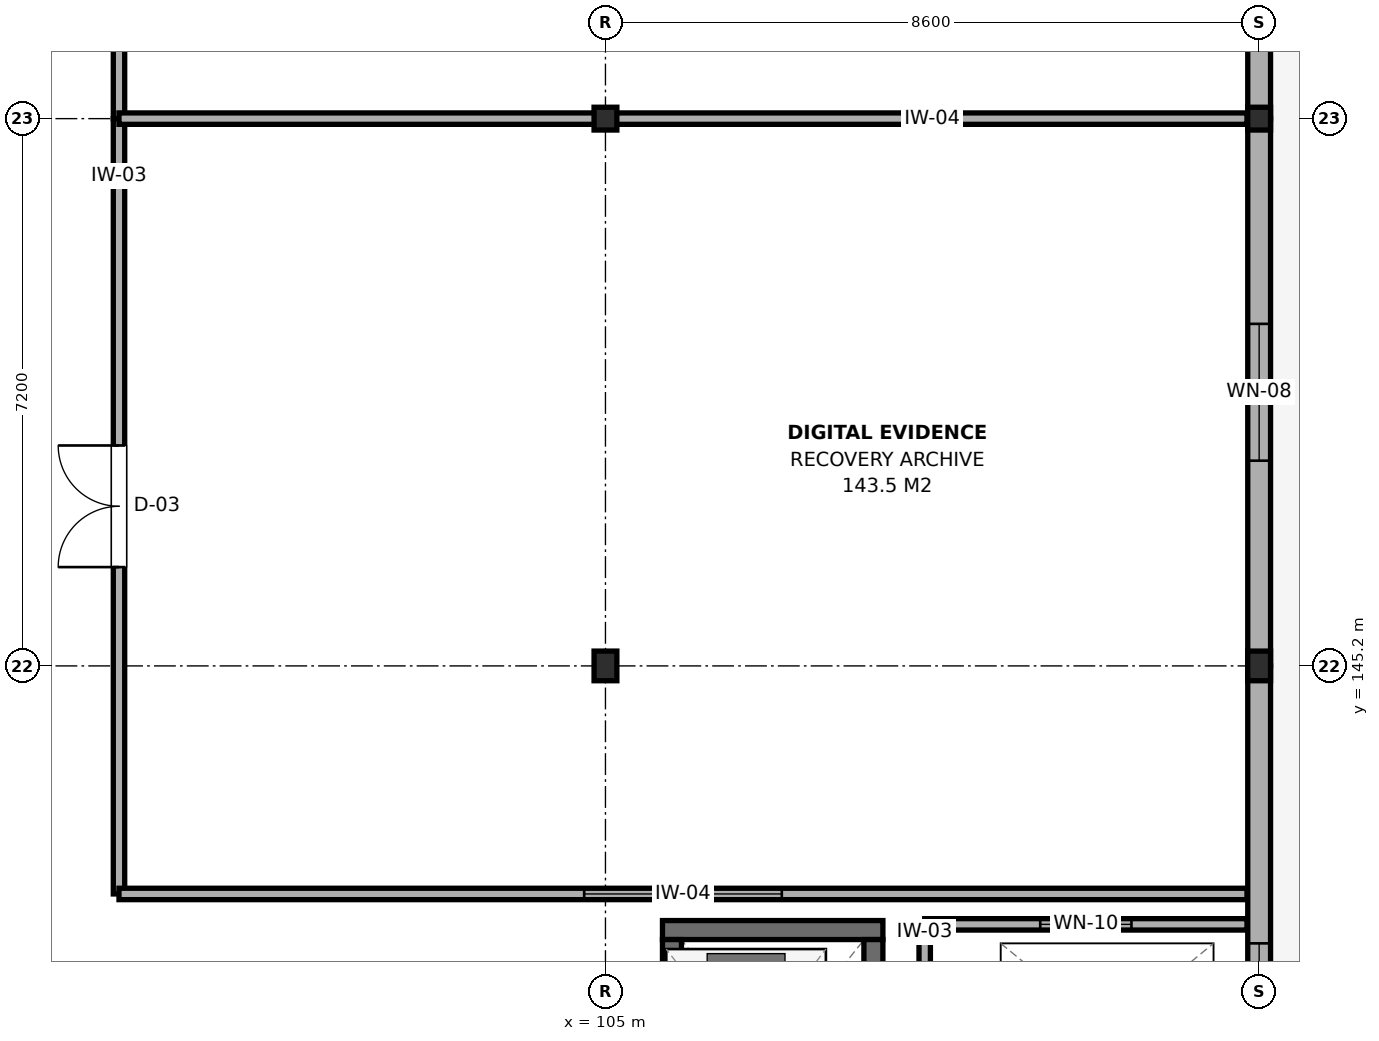
"""IFC4 building model, lengths in metres.
Left out: names, types, materials, properties, quantities, classifications, styles, units other than length and angle.
Written with IfcOpenShell. Run it as: python <this file> out.ifc"""

import sys

from ifc_helpers import new_model, si_unit, direction, frame, frame_2d, origin, origin_2d, place, context, subcontext, project, spatial, rectangle, i_section, extrude, element, fill, save


model = new_model("IFC4")
c1 = context("Model", 3, precision=1e-05, world=origin(), true_north=direction((0.0, 1.0)))
c2 = subcontext(c1, "Body", "Model", "MODEL_VIEW")
j1 = project(units=[si_unit("LENGTHUNIT", "METRE"), si_unit("PLANEANGLEUNIT", "RADIAN")], contexts=[c1])
p1 = place(None, origin())
s1 = spatial("IfcSite", under=j1, at=p1, CompositionType="ELEMENT")
p2 = place(p1, origin())
s2 = spatial("IfcBuilding", under=s1, at=p2, CompositionType="ELEMENT")
p3 = place(p2, frame((0.0, 0.0, 17.1)))
s3 = spatial("IfcBuildingStorey", under=s2, at=p3, CompositionType="ELEMENT", Elevation=17.1)
p4 = place(p3, frame((105.0, 145.2, 0.0), z_axis=(0.0, 0.0, 1.0), x_axis=(1.0, 0.0, 0.0)))
e1 = element("IfcColumn", 1, at=p4, inside=s3, PredefinedType="COLUMN", context=c2, shape_type="SweptSolid", body=[
    extrude(i_section(OverallWidth=0.3, OverallDepth=0.39, WebThickness=0.011, FlangeThickness=0.019, FilletRadius=0.027, at=origin_2d()), origin(), (0.0, 0.0, 1.0), 3.9),
])
p5 = place(p3, frame((105.0, 152.4, 0.0), z_axis=(0.0, 0.0, 1.0), x_axis=(1.0, 0.0, 0.0)))
e2 = element("IfcColumn", 2, at=p5, inside=s3, PredefinedType="COLUMN", context=c2, shape_type="SweptSolid", body=[
    extrude(i_section(OverallWidth=0.3, OverallDepth=0.3, WebThickness=0.011, FlangeThickness=0.019, FilletRadius=0.027, at=origin_2d()), origin(), (0.0, 0.0, 1.0), 3.9),
])
p6 = place(p3, frame((113.6, 145.2, 0.0), z_axis=(0.0, 0.0, 1.0), x_axis=(1.0, 0.0, 0.0)))
e3 = element("IfcColumn", 3, at=p6, inside=s3, PredefinedType="COLUMN", context=c2, shape_type="SweptSolid", body=[
    extrude(i_section(OverallWidth=0.3, OverallDepth=0.39, WebThickness=0.011, FlangeThickness=0.019, FilletRadius=0.027, at=origin_2d()), origin(), (0.0, 0.0, 1.0), 3.9),
])
p7 = place(p3, frame((113.6, 152.4, 0.0), z_axis=(0.0, 0.0, 1.0), x_axis=(1.0, 0.0, 0.0)))
e4 = element("IfcColumn", 4, at=p7, inside=s3, PredefinedType="COLUMN", context=c2, shape_type="SweptSolid", body=[
    extrude(i_section(OverallWidth=0.3, OverallDepth=0.3, WebThickness=0.011, FlangeThickness=0.019, FilletRadius=0.027, at=origin_2d()), origin(), (0.0, 0.0, 1.0), 3.9),
])
p8 = place(p3, frame((105.75, 141.725, 0.0), z_axis=(0.0, 0.0, 1.0), x_axis=(1.0, 0.0, 0.0)))
e5 = element("IfcWall", 5, at=p8, inside=s3, PredefinedType="SHEAR", context=c2, shape_type="SweptSolid", body=[
    extrude(rectangle(XDim=2.9, YDim=0.25, at=frame_2d((1.45, 0.0))), origin(), (0.0, 0.0, 1.0), 3.7),
])
p9 = place(p3, frame((105.875, 138.6, 0.0), z_axis=(0.0, 0.0, 1.0), x_axis=(0.0, 1.0, 0.0)))
e6 = element("IfcWall", 6, at=p9, inside=s3, PredefinedType="SHEAR", context=c2, shape_type="SweptSolid", body=[
    extrude(rectangle(XDim=3.0, YDim=0.25, at=frame_2d((1.5, 0.0))), origin(), (0.0, 0.0, 1.0), 3.7),
])
p10 = place(p9, frame((0.925, 0.0, 0.0)))
e7 = element("IfcOpeningElement", 7, at=p10, cuts=e6, PredefinedType="OPENING", context=c2, shape_type="SweptSolid", body=[
    extrude(rectangle(XDim=1.15, YDim=2.15, at=frame_2d((0.575, 1.075))), frame((0.0, 0.14, 0.0), z_axis=(0.0, -1.0, 0.0), x_axis=(1.0, 0.0, 0.0)), (0.0, 0.0, 1.0), 0.28),
])
p11 = place(p3, frame((108.525, 138.6, 0.0), z_axis=(0.0, 0.0, 1.0), x_axis=(0.0, 1.0, 0.0)))
e8 = element("IfcWall", 8, at=p11, inside=s3, PredefinedType="SHEAR", context=c2, shape_type="SweptSolid", body=[
    extrude(rectangle(XDim=3.0, YDim=0.25, at=frame_2d((1.5, 0.0))), origin(), (0.0, 0.0, 1.0), 3.7),
])
p12 = place(p3, frame((113.6, 138.0, 0.0), z_axis=(0.0, 0.0, 1.0), x_axis=(0.0, 1.0, 0.0)))
e9 = element("IfcWall", 9, at=p12, inside=s3, PredefinedType="SOLIDWALL", context=c2, shape_type="SweptSolid", body=[
    extrude(rectangle(XDim=7.2, YDim=0.3, at=frame_2d((3.6, 0.0))), origin(), (0.0, 0.0, 1.0), 3.095),
])
p13 = place(p12, frame((1.75, 0.0, 0.65)))
e10 = element("IfcOpeningElement", 10, at=p13, cuts=e9, PredefinedType="OPENING", context=c2, shape_type="SweptSolid", body=[
    extrude(rectangle(XDim=1.8, YDim=1.2, at=frame_2d((0.9, 0.6))), frame((0.0, 0.165, 0.0), z_axis=(0.0, -1.0, 0.0), x_axis=(1.0, 0.0, 0.0)), (0.0, 0.0, 1.0), 0.33),
])
p14 = place(p3, frame((113.6, 145.2, 0.0), z_axis=(0.0, 0.0, 1.0), x_axis=(0.0, 1.0, 0.0)))
e11 = element("IfcWall", 11, at=p14, inside=s3, PredefinedType="SOLIDWALL", context=c2, shape_type="SweptSolid", body=[
    extrude(rectangle(XDim=7.2, YDim=0.3, at=frame_2d((3.6, 0.0))), origin(), (0.0, 0.0, 1.0), 3.095),
])
p15 = place(p14, frame((2.7, 0.0, 0.65)))
e12 = element("IfcOpeningElement", 12, at=p15, cuts=e11, PredefinedType="OPENING", context=c2, shape_type="SweptSolid", body=[
    extrude(rectangle(XDim=1.8, YDim=1.2, at=frame_2d((0.9, 0.6))), frame((0.0, 0.165, 0.0), z_axis=(0.0, -1.0, 0.0), x_axis=(1.0, 0.0, 0.0)), (0.0, 0.0, 1.0), 0.33),
])
p16 = place(p3, frame((113.6, 152.4, 0.0), z_axis=(0.0, 0.0, 1.0), x_axis=(0.0, 1.0, 0.0)))
e13 = element("IfcWall", 13, at=p16, inside=s3, PredefinedType="SOLIDWALL", context=c2, shape_type="SweptSolid", body=[
    extrude(rectangle(XDim=7.2, YDim=0.3, at=frame_2d((3.6, 0.0))), origin(), (0.0, 0.0, 1.0), 3.095),
])
p17 = place(p16, frame((2.7, 0.0, 0.65)))
e14 = element("IfcOpeningElement", 14, at=p17, cuts=e13, PredefinedType="OPENING", context=c2, shape_type="SweptSolid", body=[
    extrude(rectangle(XDim=1.8, YDim=1.2, at=frame_2d((0.9, 0.6))), frame((0.0, 0.165, 0.0), z_axis=(0.0, -1.0, 0.0), x_axis=(1.0, 0.0, 0.0)), (0.0, 0.0, 1.0), 0.33),
])
p18 = place(p3, frame((109.2, 141.8, 0.0), z_axis=(0.0, 0.0, 1.0), x_axis=(1.0, 0.0, 0.0)))
e15 = element("IfcWall", 15, at=p18, inside=s3, PredefinedType="PARTITIONING", context=c2, shape_type="SweptSolid", body=[
    extrude(rectangle(XDim=4.24, YDim=0.15, at=frame_2d((2.12, 0.0))), origin(), (0.0, 0.0, 1.0), 3.365),
])
p19 = place(p18, frame((1.52, 0.0, 0.95)))
e16 = element("IfcOpeningElement", 16, at=p19, cuts=e15, PredefinedType="OPENING", context=c2, shape_type="SweptSolid", body=[
    extrude(rectangle(XDim=1.2, YDim=1.5, at=frame_2d((0.6, 0.75))), frame((0.0, 0.09, 0.0), z_axis=(0.0, -1.0, 0.0), x_axis=(1.0, 0.0, 0.0)), (0.0, 0.0, 1.0), 0.18),
])
p20 = place(p3, frame((109.2, 139.0, 0.0), z_axis=(0.0, 0.0, 1.0), x_axis=(0.0, 1.0, 0.0)))
e17 = element("IfcWall", 17, at=p20, inside=s3, PredefinedType="PARTITIONING", context=c2, shape_type="SweptSolid", body=[
    extrude(rectangle(XDim=2.8, YDim=0.15, at=frame_2d((1.4, 0.0))), origin(), (0.0, 0.0, 1.0), 3.695),
])
p21 = place(p20, frame((0.975, 0.0, 0.0)))
e18 = element("IfcOpeningElement", 18, at=p21, cuts=e17, PredefinedType="OPENING", context=c2, shape_type="SweptSolid", body=[
    extrude(rectangle(XDim=0.85, YDim=2.1, at=frame_2d((0.425, 1.05))), frame((0.0, 0.09, 0.0), z_axis=(0.0, -1.0, 0.0), x_axis=(1.0, 0.0, 0.0)), (0.0, 0.0, 1.0), 0.18),
])
p22 = place(p3, frame((98.6, 142.2, 0.0), z_axis=(0.0, 0.0, 1.0), x_axis=(0.0, 1.0, 0.0)))
e19 = element("IfcWall", 19, at=p22, inside=s3, PredefinedType="PARTITIONING", context=c2, shape_type="SweptSolid", body=[
    extrude(rectangle(XDim=10.2, YDim=0.15, at=frame_2d((5.1, 0.0))), origin(), (0.0, 0.0, 1.0), 3.255),
])
p23 = place(p22, frame((4.3, 0.0, 0.0)))
e20 = element("IfcOpeningElement", 20, at=p23, cuts=e19, PredefinedType="OPENING", context=c2, shape_type="SweptSolid", body=[
    extrude(rectangle(XDim=1.6, YDim=2.15, at=frame_2d((0.8, 1.075))), frame((0.0, 0.09, 0.0), z_axis=(0.0, -1.0, 0.0), x_axis=(1.0, 0.0, 0.0)), (0.0, 0.0, 1.0), 0.18),
])
p24 = place(p3, frame((98.6, 142.2, 0.0), z_axis=(0.0, 0.0, 1.0), x_axis=(1.0, 0.0, 0.0)))
e21 = element("IfcWall", 21, at=p24, inside=s3, PredefinedType="PARTITIONING", context=c2, shape_type="SweptSolid", body=[
    extrude(rectangle(XDim=14.84, YDim=0.15, at=frame_2d((7.42, 0.0))), origin(), (0.0, 0.0, 1.0), 3.365),
])
p25 = place(p24, frame((6.12, 0.0, 0.95)))
e22 = element("IfcOpeningElement", 22, at=p25, cuts=e21, PredefinedType="OPENING", context=c2, shape_type="SweptSolid", body=[
    extrude(rectangle(XDim=2.6, YDim=1.5, at=frame_2d((1.3, 0.75))), frame((0.0, 0.09, 0.0), z_axis=(0.0, -1.0, 0.0), x_axis=(1.0, 0.0, 0.0)), (0.0, 0.0, 1.0), 0.18),
])
p26 = place(p3, frame((98.6, 152.4, 0.0), z_axis=(0.0, 0.0, 1.0), x_axis=(0.0, 1.0, 0.0)))
e23 = element("IfcWall", 23, at=p26, inside=s3, PredefinedType="PARTITIONING", context=c2, shape_type="SweptSolid", body=[
    extrude(rectangle(XDim=7.2, YDim=0.15, at=frame_2d((3.6, 0.0))), origin(), (0.0, 0.0, 1.0), 3.155),
])
p27 = place(p26, frame((2.8, 0.0, 0.0)))
e24 = element("IfcOpeningElement", 24, at=p27, cuts=e23, PredefinedType="OPENING", context=c2, shape_type="SweptSolid", body=[
    extrude(rectangle(XDim=1.6, YDim=2.15, at=frame_2d((0.8, 1.075))), frame((0.0, 0.09, 0.0), z_axis=(0.0, -1.0, 0.0), x_axis=(1.0, 0.0, 0.0)), (0.0, 0.0, 1.0), 0.18),
])
p28 = place(p3, frame((98.6, 152.4, 0.0), z_axis=(0.0, 0.0, 1.0), x_axis=(1.0, 0.0, 0.0)))
e25 = element("IfcWall", 25, at=p28, inside=s3, PredefinedType="PARTITIONING", context=c2, shape_type="SweptSolid", body=[
    extrude(rectangle(XDim=14.84, YDim=0.15, at=frame_2d((7.42, 0.0))), origin(), (0.0, 0.0, 1.0), 3.095),
])
p29 = place(p13, origin())
e26 = element("IfcWindow", 26, at=p29, inside=s3, PartitioningType="SINGLE_PANEL", PredefinedType="WINDOW", context=c2, shape_type="SweptSolid", body=[
    extrude(rectangle(XDim=1.8, YDim=1.2, at=frame_2d((0.9, 0.6))), frame((0.0, 0.03, 0.0), z_axis=(0.0, -1.0, 0.0), x_axis=(1.0, 0.0, 0.0)), (0.0, 0.0, 1.0), 0.06),
])
fill(e10, e26)
p30 = place(p15, origin())
e27 = element("IfcWindow", 27, at=p30, inside=s3, PartitioningType="SINGLE_PANEL", PredefinedType="WINDOW", context=c2, shape_type="SweptSolid", body=[
    extrude(rectangle(XDim=1.8, YDim=1.2, at=frame_2d((0.9, 0.6))), frame((0.0, 0.03, 0.0), z_axis=(0.0, -1.0, 0.0), x_axis=(1.0, 0.0, 0.0)), (0.0, 0.0, 1.0), 0.06),
])
fill(e12, e27)
p31 = place(p19, origin())
e28 = element("IfcWindow", 28, at=p31, inside=s3, PartitioningType="SINGLE_PANEL", PredefinedType="WINDOW", context=c2, shape_type="SweptSolid", body=[
    extrude(rectangle(XDim=1.2, YDim=1.5, at=frame_2d((0.6, 0.75))), frame((0.0, 0.03, 0.0), z_axis=(0.0, -1.0, 0.0), x_axis=(1.0, 0.0, 0.0)), (0.0, 0.0, 1.0), 0.06),
])
fill(e16, e28)
p32 = place(p23, origin())
e29 = element("IfcDoor", 29, at=p32, inside=s3, OperationType="DOUBLE_DOOR_SINGLE_SWING", PredefinedType="DOOR", context=c2, shape_type="SweptSolid", body=[
    extrude(rectangle(XDim=1.6, YDim=2.15, at=frame_2d((0.8, 1.075))), frame((0.0, 0.025, 0.0), z_axis=(0.0, -1.0, 0.0), x_axis=(1.0, 0.0, 0.0)), (0.0, 0.0, 1.0), 0.05),
])
fill(e20, e29)
p33 = place(p25, origin())
e30 = element("IfcWindow", 30, at=p33, inside=s3, PartitioningType="SINGLE_PANEL", PredefinedType="WINDOW", context=c2, shape_type="SweptSolid", body=[
    extrude(rectangle(XDim=2.6, YDim=1.5, at=frame_2d((1.3, 0.75))), frame((0.0, 0.03, 0.0), z_axis=(0.0, -1.0, 0.0), x_axis=(1.0, 0.0, 0.0)), (0.0, 0.0, 1.0), 0.06),
])
fill(e22, e30)
save(model, sys.argv[1])
